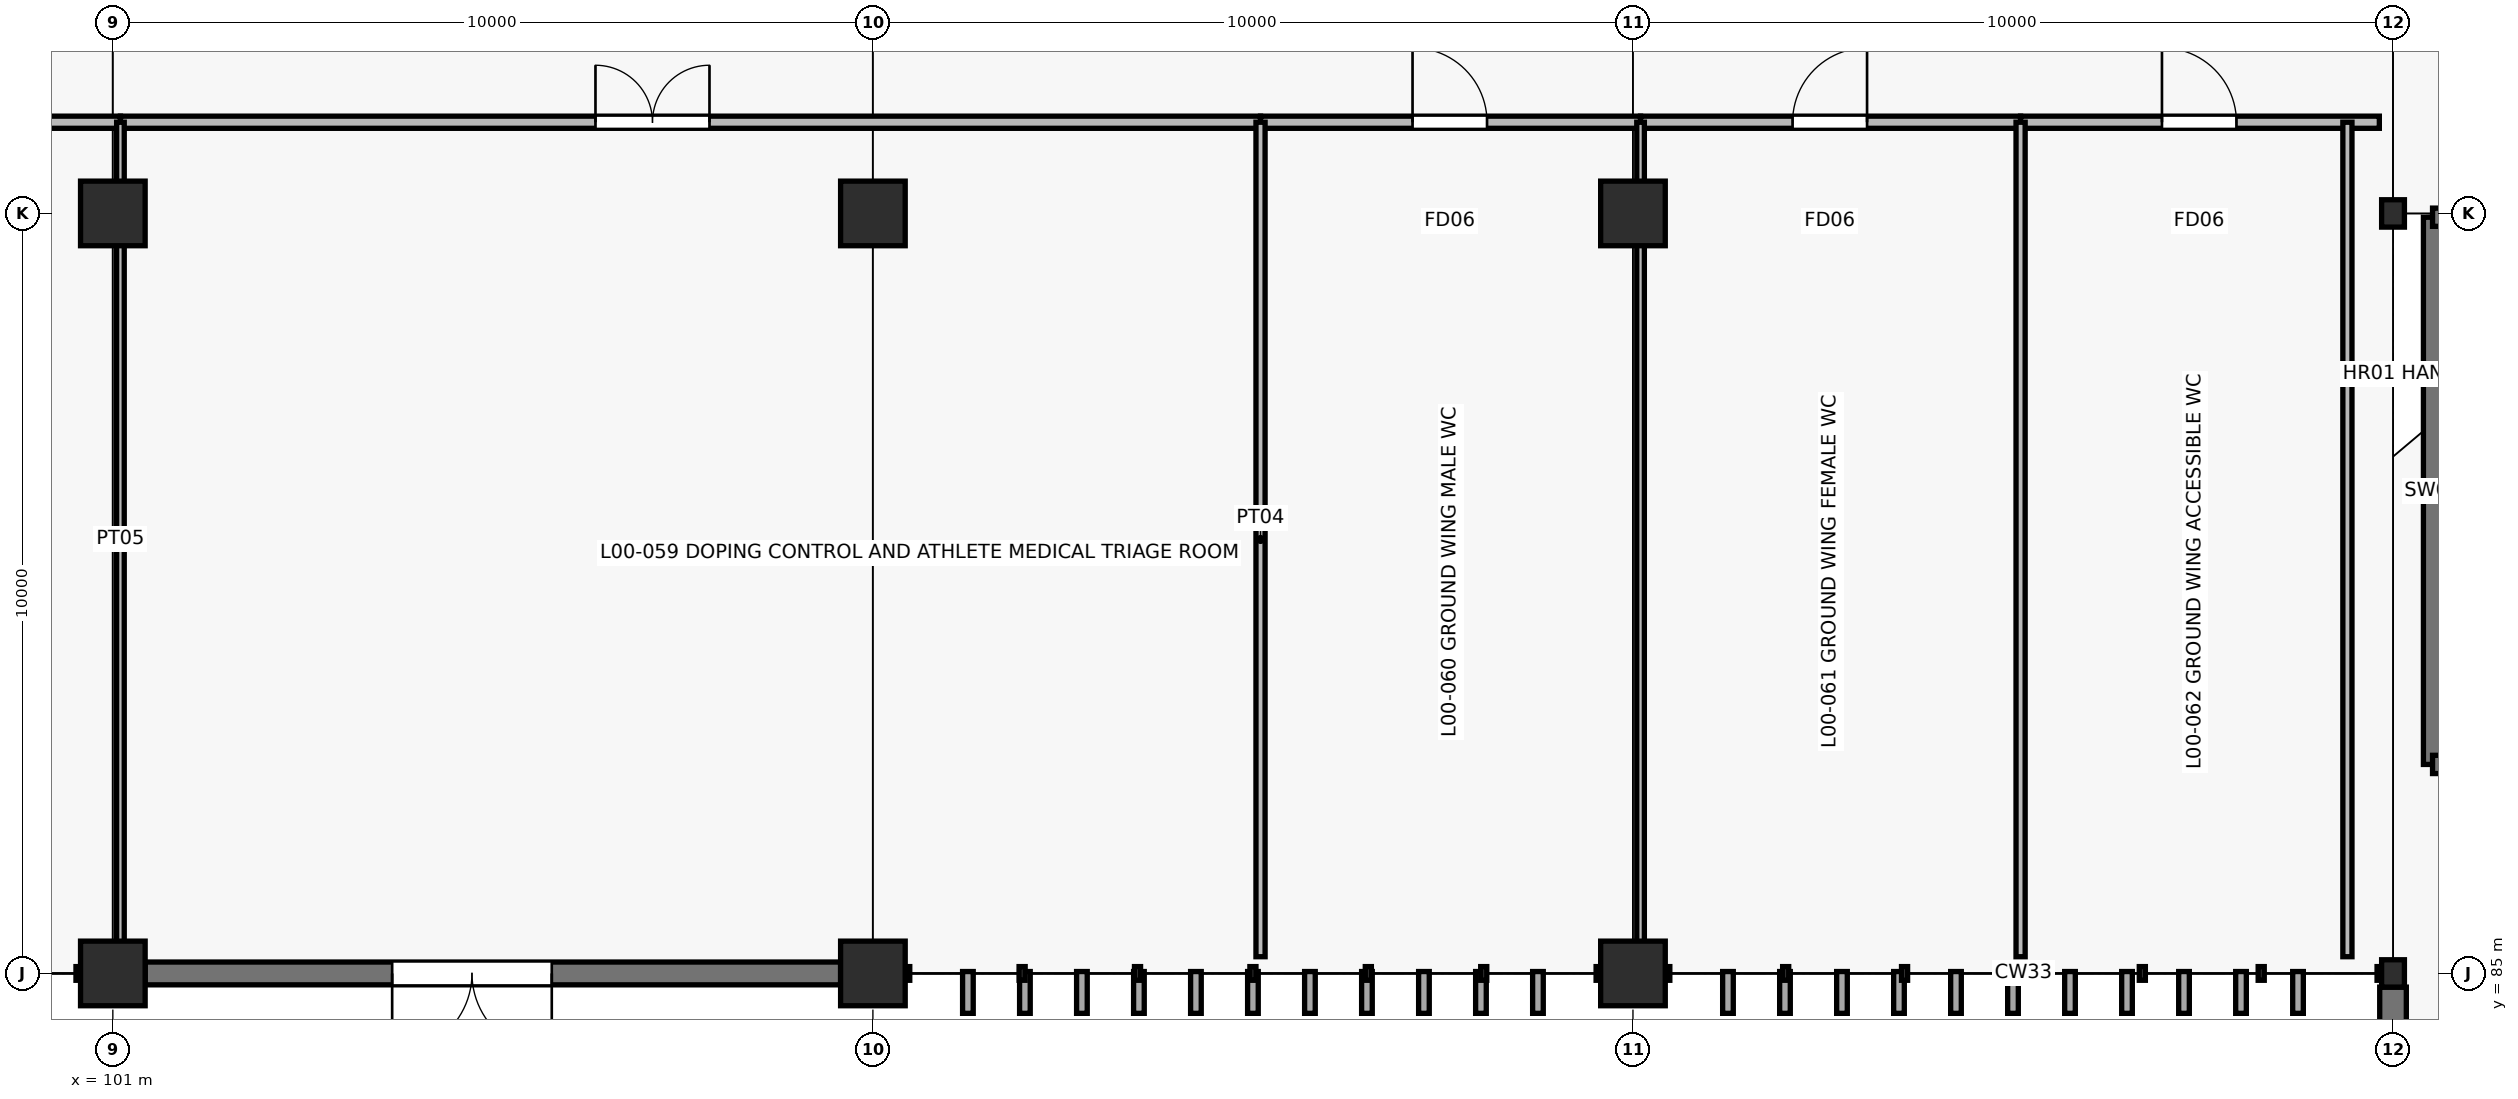
"""IFC4 building model, lengths in metres.
Left out: names, types, materials, properties, quantities, classifications, styles, units other than length and angle.
Written with IfcOpenShell. Run it as: python <this file> out.ifc"""

import sys

from ifc_helpers import new_model, si_unit, direction, frame, frame_2d, origin, origin_2d, place, context, subcontext, project, spatial, rectangle, i_section, extrude, element, fill, save


model = new_model("IFC4")
c1 = context("Model", 3, precision=1e-05, world=origin(), true_north=direction((0.0, 1.0)))
c2 = subcontext(c1, "Body", "Model", "MODEL_VIEW")
j1 = project(units=[si_unit("LENGTHUNIT", "METRE"), si_unit("PLANEANGLEUNIT", "RADIAN")], contexts=[c1])
p1 = place(None, origin())
s1 = spatial("IfcSite", under=j1, at=p1, CompositionType="ELEMENT")
p2 = place(p1, origin())
s2 = spatial("IfcBuilding", under=s1, at=p2, CompositionType="ELEMENT")
p3 = place(p2, origin())
s3 = spatial("IfcBuildingStorey", under=s2, at=p3, CompositionType="ELEMENT", Elevation=0.0)
for number, where, z_axis, x_axis in (
    (1, (131.0, 85.0, 0.0), (0.0, 0.0, 1.0), (1.0, 0.0, 0.0)),
    (2, (131.0, 95.0, 0.0), (0.0, 0.0, 1.0), (1.0, 0.0, 0.0)),
):
    element("IfcColumn", number, at=place(p3, frame(where, z_axis=z_axis, x_axis=x_axis)), inside=s3, PredefinedType="COLUMN", context=c2, shape_type="SweptSolid", body=[
        extrude(i_section(OverallWidth=0.3, OverallDepth=0.36, WebThickness=0.012, FlangeThickness=0.022, at=origin_2d()), origin(), (0.0, 0.0, 1.0), 4.8),
    ])
for number, where, z_axis, x_axis in (
    (3, (101.0, 85.0, 0.0), (0.0, 0.0, 1.0), (1.0, 0.0, 0.0)),
    (4, (101.0, 95.0, 0.0), (0.0, 0.0, 1.0), (1.0, 0.0, 0.0)),
    (5, (111.0, 85.0, 0.0), (0.0, 0.0, 1.0), (1.0, 0.0, 0.0)),
    (6, (111.0, 95.0, 0.0), (0.0, 0.0, 1.0), (1.0, 0.0, 0.0)),
    (7, (121.0, 85.0, 0.0), (0.0, 0.0, 1.0), (1.0, 0.0, 0.0)),
    (8, (121.0, 95.0, 0.0), (0.0, 0.0, 1.0), (1.0, 0.0, 0.0)),
):
    element("IfcColumn", number, at=place(p3, frame(where, z_axis=z_axis, x_axis=x_axis)), inside=s3, PredefinedType="COLUMN", context=c2, shape_type="SweptSolid", body=[
        extrude(rectangle(XDim=0.85, YDim=0.85, at=origin_2d()), origin(), (0.0, 0.0, 1.0), 4.8),
    ])
p4 = place(p3, frame((131.0, 73.95, 0.0), z_axis=(0.0, 0.0, 1.0), x_axis=(0.0, 1.0, 0.0)))
e9 = element("IfcWall", 9, at=p4, inside=s3, PredefinedType="SOLIDWALL", context=c2, shape_type="SweptSolid", body=[
    extrude(rectangle(XDim=10.87, YDim=0.35, at=frame_2d((5.435, 0.0))), origin(), (0.0, 0.0, 1.0), 4.8),
])
p5 = place(p4, frame((3.6, 0.0, 0.0)))
e10 = element("IfcOpeningElement", 10, at=p5, cuts=e9, PredefinedType="OPENING", context=c2, shape_type="SweptSolid", body=[
    extrude(rectangle(XDim=2.1, YDim=2.35, at=frame_2d((1.05, 1.175))), frame((0.0, 0.185, 0.0), z_axis=(0.0, -1.0, 0.0), x_axis=(1.0, 0.0, 0.0)), (0.0, 0.0, 1.0), 0.37),
])
p6 = place(p3, frame((110.575, 85.0, 0.0), z_axis=(0.0, 0.0, 1.0), x_axis=(-1.0, 0.0, 0.0)))
e11 = element("IfcWall", 11, at=p6, inside=s3, PredefinedType="SOLIDWALL", context=c2, shape_type="SweptSolid", body=[
    extrude(rectangle(XDim=9.15, YDim=0.3, at=frame_2d((4.575, 0.0))), origin(), (0.0, 0.0, 1.0), 4.8),
])
p7 = place(p6, frame((3.8, 0.0, 0.0)))
e12 = element("IfcOpeningElement", 12, at=p7, cuts=e11, PredefinedType="OPENING", context=c2, shape_type="SweptSolid", body=[
    extrude(rectangle(XDim=2.1, YDim=2.35, at=frame_2d((1.05, 1.175))), frame((0.0, 0.16, 0.0), z_axis=(0.0, -1.0, 0.0), x_axis=(1.0, 0.0, 0.0)), (0.0, 0.0, 1.0), 0.32),
])
p8 = place(p3, frame((131.52, 87.75, 0.0), z_axis=(0.0, 0.0, 1.0), x_axis=(0.0, 1.0, 0.0)))
e13 = element("IfcWall", 13, at=p8, inside=s3, PredefinedType="SHEAR", context=c2, shape_type="SweptSolid", body=[
    extrude(rectangle(XDim=7.2, YDim=0.24, at=frame_2d((3.6, 0.0))), origin(), (0.0, 0.0, 1.0), 4.8),
])
p9 = place(p3, frame((131.52, 94.95, 0.0), z_axis=(0.0, 0.0, 1.0), x_axis=(1.0, 0.0, 0.0)))
e14 = element("IfcWall", 14, at=p9, inside=s3, PredefinedType="SHEAR", context=c2, shape_type="SweptSolid", body=[
    extrude(rectangle(XDim=4.16, YDim=0.24, at=frame_2d((2.08, 0.0))), origin(), (0.0, 0.0, 1.0), 4.8),
])
p10 = place(p3, frame((131.52, 87.75, 0.0), z_axis=(0.0, 0.0, 1.0), x_axis=(1.0, 0.0, 0.0)))
e15 = element("IfcWall", 15, at=p10, inside=s3, PredefinedType="SHEAR", context=c2, shape_type="SweptSolid", body=[
    extrude(rectangle(XDim=4.16, YDim=0.24, at=frame_2d((2.08, 0.0))), origin(), (0.0, 0.0, 1.0), 4.8),
])
p11 = place(p10, frame((0.35, 0.0, 0.0)))
e16 = element("IfcOpeningElement", 16, at=p11, cuts=e15, PredefinedType="OPENING", context=c2, shape_type="SweptSolid", body=[
    extrude(rectangle(XDim=1.0, YDim=2.15, at=frame_2d((0.5, 1.075))), frame((0.0, 0.13, 0.0), z_axis=(0.0, -1.0, 0.0), x_axis=(1.0, 0.0, 0.0)), (0.0, 0.0, 1.0), 0.26),
])
p12 = place(p3, frame((87.3, 96.2, 0.0), z_axis=(0.0, 0.0, 1.0), x_axis=(1.0, 0.0, 0.0)))
e17 = element("IfcWall", 17, at=p12, inside=s3, PredefinedType="PARTITIONING", context=c2, shape_type="SweptSolid", body=[
    extrude(rectangle(XDim=13.8, YDim=0.16, at=frame_2d((6.9, 0.0))), origin(), (0.0, 0.0, 1.0), 3.525),
])
p13 = place(p12, frame((6.2, 0.0, 0.0)))
e18 = element("IfcOpeningElement", 18, at=p13, cuts=e17, PredefinedType="OPENING", context=c2, shape_type="SweptSolid", body=[
    extrude(rectangle(XDim=1.4, YDim=2.2, at=frame_2d((0.7, 1.1))), frame((0.0, 0.09, 0.0), z_axis=(0.0, -1.0, 0.0), x_axis=(1.0, 0.0, 0.0)), (0.0, 0.0, 1.0), 0.18),
])
p14 = place(p3, frame((101.1, 96.2, 0.0), z_axis=(0.0, 0.0, 1.0), x_axis=(1.0, 0.0, 0.0)))
e19 = element("IfcWall", 19, at=p14, inside=s3, PredefinedType="PARTITIONING", context=c2, shape_type="SweptSolid", body=[
    extrude(rectangle(XDim=15.0, YDim=0.16, at=frame_2d((7.5, 0.0))), origin(), (0.0, 0.0, 1.0), 3.525),
])
p15 = place(p14, frame((6.25, 0.0, 0.0)))
e20 = element("IfcOpeningElement", 20, at=p15, cuts=e19, PredefinedType="OPENING", context=c2, shape_type="SweptSolid", body=[
    extrude(rectangle(XDim=1.5, YDim=2.2, at=frame_2d((0.75, 1.1))), frame((0.0, 0.09, 0.0), z_axis=(0.0, -1.0, 0.0), x_axis=(1.0, 0.0, 0.0)), (0.0, 0.0, 1.0), 0.18),
])
p16 = place(p3, frame((101.1, 85.22, 0.0), z_axis=(0.0, 0.0, 1.0), x_axis=(0.0, 1.0, 0.0)))
e21 = element("IfcWall", 21, at=p16, inside=s3, PredefinedType="PARTITIONING", context=c2, shape_type="SweptSolid", body=[
    extrude(rectangle(XDim=10.98, YDim=0.1, at=frame_2d((5.49, 0.0))), origin(), (0.0, 0.0, 1.0), 3.525),
])
p17 = place(p3, frame((116.1, 96.2, 0.0), z_axis=(0.0, 0.0, 1.0), x_axis=(1.0, 0.0, 0.0)))
e22 = element("IfcWall", 22, at=p17, inside=s3, PredefinedType="PARTITIONING", context=c2, shape_type="SweptSolid", body=[
    extrude(rectangle(XDim=5.0, YDim=0.16, at=frame_2d((2.5, 0.0))), origin(), (0.0, 0.0, 1.0), 3.525),
])
p18 = place(p17, frame((2.0, 0.0, 0.0)))
e23 = element("IfcOpeningElement", 23, at=p18, cuts=e22, PredefinedType="OPENING", context=c2, shape_type="SweptSolid", body=[
    extrude(rectangle(XDim=0.98, YDim=2.1, at=frame_2d((0.49, 1.05))), frame((0.0, 0.09, 0.0), z_axis=(0.0, -1.0, 0.0), x_axis=(1.0, 0.0, 0.0)), (0.0, 0.0, 1.0), 0.18),
])
p19 = place(p3, frame((116.1, 85.22, 0.0), z_axis=(0.0, 0.0, 1.0), x_axis=(0.0, 1.0, 0.0)))
e24 = element("IfcWall", 24, at=p19, inside=s3, PredefinedType="PARTITIONING", context=c2, shape_type="SweptSolid", body=[
    extrude(rectangle(XDim=10.98, YDim=0.12, at=frame_2d((5.49, 0.0))), origin(), (0.0, 0.0, 1.0), 3.625),
])
p20 = place(p3, frame((121.1, 96.2, 0.0), z_axis=(0.0, 0.0, 1.0), x_axis=(1.0, 0.0, 0.0)))
e25 = element("IfcWall", 25, at=p20, inside=s3, PredefinedType="PARTITIONING", context=c2, shape_type="SweptSolid", body=[
    extrude(rectangle(XDim=5.0, YDim=0.16, at=frame_2d((2.5, 0.0))), origin(), (0.0, 0.0, 1.0), 3.525),
])
p21 = place(p20, frame((2.0, 0.0, 0.0)))
e26 = element("IfcOpeningElement", 26, at=p21, cuts=e25, PredefinedType="OPENING", context=c2, shape_type="SweptSolid", body=[
    extrude(rectangle(XDim=0.98, YDim=2.1, at=frame_2d((0.49, 1.05))), frame((0.0, 0.09, 0.0), z_axis=(0.0, -1.0, 0.0), x_axis=(1.0, 0.0, 0.0)), (0.0, 0.0, 1.0), 0.18),
])
p22 = place(p3, frame((121.1, 85.22, 0.0), z_axis=(0.0, 0.0, 1.0), x_axis=(0.0, 1.0, 0.0)))
e27 = element("IfcWall", 27, at=p22, inside=s3, PredefinedType="PARTITIONING", context=c2, shape_type="SweptSolid", body=[
    extrude(rectangle(XDim=10.98, YDim=0.1, at=frame_2d((5.49, 0.0))), origin(), (0.0, 0.0, 1.0), 3.525),
])
p23 = place(p3, frame((126.1, 96.2, 0.0), z_axis=(0.0, 0.0, 1.0), x_axis=(1.0, 0.0, 0.0)))
e28 = element("IfcWall", 28, at=p23, inside=s3, PredefinedType="PARTITIONING", context=c2, shape_type="SweptSolid", body=[
    extrude(rectangle(XDim=4.72, YDim=0.16, at=frame_2d((2.36, 0.0))), origin(), (0.0, 0.0, 1.0), 3.525),
])
p24 = place(p23, frame((1.86, 0.0, 0.0)))
e29 = element("IfcOpeningElement", 29, at=p24, cuts=e28, PredefinedType="OPENING", context=c2, shape_type="SweptSolid", body=[
    extrude(rectangle(XDim=0.98, YDim=2.1, at=frame_2d((0.49, 1.05))), frame((0.0, 0.09, 0.0), z_axis=(0.0, -1.0, 0.0), x_axis=(1.0, 0.0, 0.0)), (0.0, 0.0, 1.0), 0.18),
])
for number, where, z_axis, x_axis in (
    (30, (126.1, 85.22, 0.0), (0.0, 0.0, 1.0), (0.0, 1.0, 0.0)),
    (31, (130.4, 85.22, 0.0), (0.0, 0.0, 1.0), (0.0, 1.0, 0.0)),
):
    element("IfcWall", number, at=place(p3, frame(where, z_axis=z_axis, x_axis=x_axis)), inside=s3, PredefinedType="PARTITIONING", context=c2, shape_type="SweptSolid", body=[
        extrude(rectangle(XDim=10.98, YDim=0.12, at=frame_2d((5.49, 0.0))), origin(), (0.0, 0.0, 1.0), 3.625),
    ])
p25 = place(p7, origin())
e32 = element("IfcDoor", 32, at=p25, inside=s3, OperationType="DOUBLE_DOOR_SINGLE_SWING", PredefinedType="DOOR", context=c2, shape_type="SweptSolid", body=[
    extrude(rectangle(XDim=2.1, YDim=2.35, at=frame_2d((1.05, 1.175))), frame((0.0, 0.025, 0.0), z_axis=(0.0, -1.0, 0.0), x_axis=(1.0, 0.0, 0.0)), (0.0, 0.0, 1.0), 0.05),
])
fill(e12, e32)
p26 = place(p15, origin())
e33 = element("IfcDoor", 33, at=p26, inside=s3, OperationType="DOUBLE_DOOR_SINGLE_SWING", PredefinedType="DOOR", context=c2, shape_type="SweptSolid", body=[
    extrude(rectangle(XDim=1.5, YDim=2.2, at=frame_2d((0.75, 1.1))), frame((0.0, 0.025, 0.0), z_axis=(0.0, -1.0, 0.0), x_axis=(1.0, 0.0, 0.0)), (0.0, 0.0, 1.0), 0.05),
])
fill(e20, e33)
p27 = place(p18, origin())
e34 = element("IfcDoor", 34, at=p27, inside=s3, OperationType="SINGLE_SWING_LEFT", PredefinedType="DOOR", context=c2, shape_type="SweptSolid", body=[
    extrude(rectangle(XDim=0.98, YDim=2.1, at=frame_2d((0.49, 1.05))), frame((0.0, 0.025, 0.0), z_axis=(0.0, -1.0, 0.0), x_axis=(1.0, 0.0, 0.0)), (0.0, 0.0, 1.0), 0.05),
])
fill(e23, e34)
p28 = place(p21, origin())
e35 = element("IfcDoor", 35, at=p28, inside=s3, OperationType="SINGLE_SWING_RIGHT", PredefinedType="DOOR", context=c2, shape_type="SweptSolid", body=[
    extrude(rectangle(XDim=0.98, YDim=2.1, at=frame_2d((0.49, 1.05))), frame((0.0, 0.025, 0.0), z_axis=(0.0, -1.0, 0.0), x_axis=(1.0, 0.0, 0.0)), (0.0, 0.0, 1.0), 0.05),
])
fill(e26, e35)
p29 = place(p24, origin())
e36 = element("IfcDoor", 36, at=p29, inside=s3, OperationType="SINGLE_SWING_LEFT", PredefinedType="DOOR", context=c2, shape_type="SweptSolid", body=[
    extrude(rectangle(XDim=0.98, YDim=2.1, at=frame_2d((0.49, 1.05))), frame((0.0, 0.025, 0.0), z_axis=(0.0, -1.0, 0.0), x_axis=(1.0, 0.0, 0.0)), (0.0, 0.0, 1.0), 0.05),
])
fill(e29, e36)
save(model, sys.argv[1])
